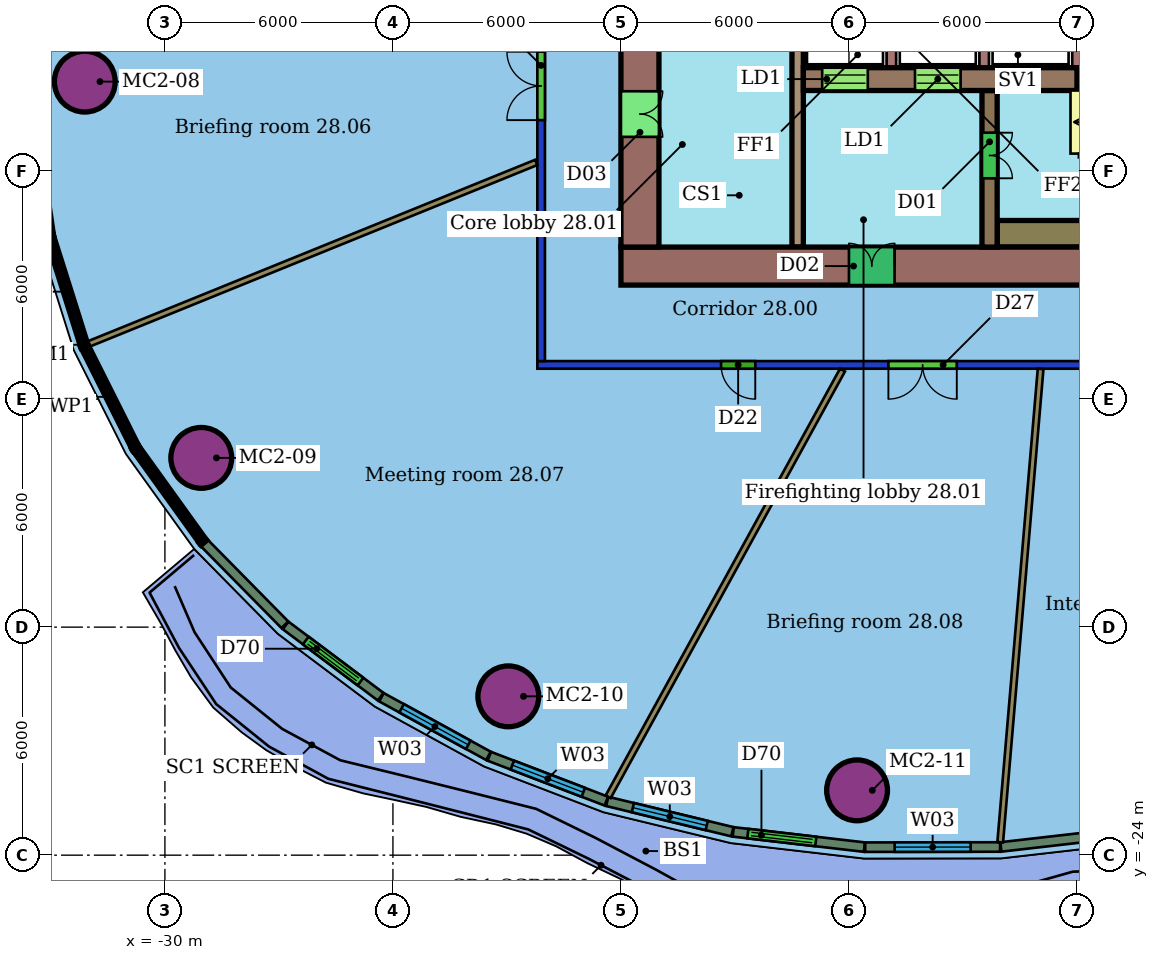
"""IFC4 building model, lengths in metres.
Left out: names, types, materials, properties, quantities, classifications, styles, units other than length and angle.
Written with IfcOpenShell. Run it as: python <this file> out.ifc"""

import sys

from ifc_helpers import new_model, si_unit, direction, frame, frame_2d, origin, origin_2d, place, context, subcontext, project, spatial, rectangle, hollow_circle, extrude, element, fill, save


model = new_model("IFC4")
c1 = context("Model", 3, precision=1e-05, world=origin(), true_north=direction((0.0, 1.0)))
c2 = subcontext(c1, "Body", "Model", "MODEL_VIEW")
j1 = project(units=[si_unit("LENGTHUNIT", "METRE"), si_unit("PLANEANGLEUNIT", "RADIAN")], contexts=[c1])
p1 = place(None, origin())
s1 = spatial("IfcSite", under=j1, at=p1, CompositionType="ELEMENT")
p2 = place(p1, origin())
s2 = spatial("IfcBuilding", under=s1, at=p2, CompositionType="ELEMENT")
p3 = place(p2, frame((0.0, 0.0, 121.0)))
s3 = spatial("IfcBuildingStorey", under=s2, at=p3, CompositionType="ELEMENT", Elevation=121.0)
for number, where, z_axis, x_axis in (
    (1, (-32.109, -3.646, 0.0), (0.0, 0.0, 1.0), (1.0, 0.0, 0.0)),
    (2, (-29.043, -13.547, 0.0), (0.0, 0.0, 1.0), (1.0, 0.0, 0.0)),
    (3, (-20.963, -19.821, 0.0), (0.0, 0.0, 1.0), (1.0, 0.0, 0.0)),
    (4, (-11.787, -22.294, 0.0), (0.0, 0.0, 1.0), (1.0, 0.0, 0.0)),
):
    element("IfcColumn", number, at=place(p3, frame(where, z_axis=z_axis, x_axis=x_axis)), inside=s3, PredefinedType="COLUMN", context=c2, shape_type="SweptSolid", body=[
        extrude(hollow_circle(Radius=0.8, WallThickness=0.055, at=origin_2d()), origin(), (0.0, 0.0, 1.0), 3.45),
    ])
p4 = place(p3, frame((8.2, -11.1, 0.0), z_axis=(0.0, 0.0, 1.0), x_axis=(-1.0, 0.0, 0.0)))
e5 = element("IfcWall", 5, at=p4, inside=s3, PredefinedType="PARTITIONING", context=c2, shape_type="SweptSolid", body=[
    extrude(rectangle(XDim=28.4, YDim=0.2, at=frame_2d((14.2, 0.0))), origin(), (0.0, 0.0, 1.0), 3.0),
])
p5 = place(p4, frame((22.666, 0.0, 0.0)))
e6 = element("IfcOpeningElement", 6, at=p5, cuts=e5, PredefinedType="OPENING", context=c2, shape_type="SweptSolid", body=[
    extrude(rectangle(XDim=0.9, YDim=2.1, at=frame_2d((0.45, 1.05))), frame((0.0, 0.11, 0.0), z_axis=(0.0, -1.0, 0.0), x_axis=(1.0, 0.0, 0.0)), (0.0, 0.0, 1.0), 0.22),
])
p6 = place(p4, frame((17.362, 0.0, 0.0)))
e7 = element("IfcOpeningElement", 7, at=p6, cuts=e5, PredefinedType="OPENING", context=c2, shape_type="SweptSolid", body=[
    extrude(rectangle(XDim=1.8, YDim=2.4, at=frame_2d((0.9, 1.2))), frame((0.0, 0.11, 0.0), z_axis=(0.0, -1.0, 0.0), x_axis=(1.0, 0.0, 0.0)), (0.0, 0.0, 1.0), 0.22),
])
p7 = place(p4, frame((12.592, 0.0, 0.0)))
e8 = element("IfcOpeningElement", 8, at=p7, cuts=e5, PredefinedType="OPENING", context=c2, shape_type="SweptSolid", body=[
    extrude(rectangle(XDim=0.9, YDim=2.1, at=frame_2d((0.45, 1.05))), frame((0.0, 0.11, 0.0), z_axis=(0.0, -1.0, 0.0), x_axis=(1.0, 0.0, 0.0)), (0.0, 0.0, 1.0), 0.22),
])
p8 = place(p4, frame((6.504, 0.0, 0.0)))
e9 = element("IfcOpeningElement", 9, at=p8, cuts=e5, PredefinedType="OPENING", context=c2, shape_type="SweptSolid", body=[
    extrude(rectangle(XDim=1.5, YDim=2.1, at=frame_2d((0.75, 1.05))), frame((0.0, 0.11, 0.0), z_axis=(0.0, -1.0, 0.0), x_axis=(1.0, 0.0, 0.0)), (0.0, 0.0, 1.0), 0.22),
])
p9 = place(p4, frame((2.423, 0.0, 0.0)))
e10 = element("IfcOpeningElement", 10, at=p9, cuts=e5, PredefinedType="OPENING", context=c2, shape_type="SweptSolid", body=[
    extrude(rectangle(XDim=1.0, YDim=2.1, at=frame_2d((0.5, 1.05))), frame((0.0, 0.11, 0.0), z_axis=(0.0, -1.0, 0.0), x_axis=(1.0, 0.0, 0.0)), (0.0, 0.0, 1.0), 0.22),
])
p10 = place(p3, frame((-20.1, -11.0, 0.0), z_axis=(0.0, 0.0, 1.0), x_axis=(0.0, 1.0, 0.0)))
e11 = element("IfcWall", 11, at=p10, inside=s3, PredefinedType="PARTITIONING", context=c2, shape_type="SweptSolid", body=[
    extrude(rectangle(XDim=22.0, YDim=0.2, at=frame_2d((11.0, 0.0))), origin(), (0.0, 0.0, 1.0), 3.0),
])
p11 = place(p10, frame((15.966, 0.0, 0.0)))
e12 = element("IfcOpeningElement", 12, at=p11, cuts=e11, PredefinedType="OPENING", context=c2, shape_type="SweptSolid", body=[
    extrude(rectangle(XDim=1.0, YDim=2.1, at=frame_2d((0.5, 1.05))), frame((0.0, 0.11, 0.0), z_axis=(0.0, -1.0, 0.0), x_axis=(1.0, 0.0, 0.0)), (0.0, 0.0, 1.0), 0.22),
])
p12 = place(p10, frame((11.613, 0.0, 0.0)))
e13 = element("IfcOpeningElement", 13, at=p12, cuts=e11, PredefinedType="OPENING", context=c2, shape_type="SweptSolid", body=[
    extrude(rectangle(XDim=1.0, YDim=2.4, at=frame_2d((0.5, 1.2))), frame((0.0, 0.11, 0.0), z_axis=(0.0, -1.0, 0.0), x_axis=(1.0, 0.0, 0.0)), (0.0, 0.0, 1.0), 0.22),
])
p13 = place(p10, frame((6.341, 0.0, 0.0)))
e14 = element("IfcOpeningElement", 14, at=p13, cuts=e11, PredefinedType="OPENING", context=c2, shape_type="SweptSolid", body=[
    extrude(rectangle(XDim=1.8, YDim=2.4, at=frame_2d((0.9, 1.2))), frame((0.0, 0.11, 0.0), z_axis=(0.0, -1.0, 0.0), x_axis=(1.0, 0.0, 0.0)), (0.0, 0.0, 1.0), 0.22),
])
p14 = place(p3, frame((-32.006, -10.549, 0.0), z_axis=(0.0, 0.0, 1.0), x_axis=(0.926664050795, 0.375890591749, 0.0)))
e15 = element("IfcWall", 15, at=p14, inside=s3, PredefinedType="PARTITIONING", context=c2, shape_type="SweptSolid", body=[
    extrude(rectangle(XDim=12.709, YDim=0.15, at=frame_2d((6.355, 0.0))), origin(), (0.0, 0.0, 1.0), 3.45),
])
p15 = place(p3, frame((-18.336, -22.463, 0.0), z_axis=(0.0, 0.0, 1.0), x_axis=(0.481358172348, 0.876523992777, 0.0)))
e16 = element("IfcWall", 16, at=p15, inside=s3, PredefinedType="PARTITIONING", context=c2, shape_type="SweptSolid", body=[
    extrude(rectangle(XDim=12.809, YDim=0.15, at=frame_2d((6.404, 0.0))), origin(), (0.0, 0.0, 1.0), 3.45),
])
p16 = place(p3, frame((-8.02, -23.66, 0.0), z_axis=(0.0, 0.0, 1.0), x_axis=(0.085065958211, 0.996375322232, 0.0)))
e17 = element("IfcWall", 17, at=p16, inside=s3, PredefinedType="PARTITIONING", context=c2, shape_type="SweptSolid", body=[
    extrude(rectangle(XDim=12.499, YDim=0.15, at=frame_2d((6.25, 0.0))), origin(), (0.0, 0.0, 1.0), 3.45),
])
p17 = place(p3, frame((-28.961, -15.789, 0.0), z_axis=(0.0, 0.0, 1.0), x_axis=(0.701948142778, -0.71222805677, 0.0)))
e18 = element("IfcWall", 18, at=p17, inside=s3, PredefinedType="SOLIDWALL", context=c2, shape_type="SweptSolid", body=[
    extrude(rectangle(XDim=3.016, YDim=0.25, at=frame_2d((1.508, 0.0))), origin(), (0.0, 0.0, 1.0), 3.05),
])
p18 = place(p3, frame((-26.824, -17.954, 0.0), z_axis=(0.0, 0.0, 1.0), x_axis=(0.799896906683, -0.60013743316, 0.0)))
e19 = element("IfcWall", 19, at=p18, inside=s3, PredefinedType="SOLIDWALL", context=c2, shape_type="SweptSolid", body=[
    extrude(rectangle(XDim=3.126, YDim=0.25, at=frame_2d((1.563, 0.0))), origin(), (0.0, 0.0, 1.0), 3.05),
])
p19 = place(p18, frame((0.663, 0.0, 0.0)))
e20 = element("IfcOpeningElement", 20, at=p19, cuts=e19, PredefinedType="OPENING", context=c2, shape_type="SweptSolid", body=[
    extrude(rectangle(XDim=1.8, YDim=2.4, at=frame_2d((0.9, 1.2))), frame((0.0, 0.135, 0.0), z_axis=(0.0, -1.0, 0.0), x_axis=(1.0, 0.0, 0.0)), (0.0, 0.0, 1.0), 0.27),
])
p20 = place(p3, frame((-24.301, -19.844, 0.0), z_axis=(0.0, 0.0, 1.0), x_axis=(0.876916884628, -0.480642047114, 0.0)))
e21 = element("IfcWall", 21, at=p20, inside=s3, PredefinedType="SOLIDWALL", context=c2, shape_type="SweptSolid", body=[
    extrude(rectangle(XDim=3.209, YDim=0.25, at=frame_2d((1.604, 0.0))), origin(), (0.0, 0.0, 1.0), 3.05),
])
p21 = place(p20, frame((0.604, 0.0, 0.9)))
e22 = element("IfcOpeningElement", 22, at=p21, cuts=e21, PredefinedType="OPENING", context=c2, shape_type="SweptSolid", body=[
    extrude(rectangle(XDim=2.0, YDim=2.1, at=frame_2d((1.0, 1.05))), frame((0.0, 0.135, 0.0), z_axis=(0.0, -1.0, 0.0), x_axis=(1.0, 0.0, 0.0)), (0.0, 0.0, 1.0), 0.27),
])
p22 = place(p3, frame((-21.464, -21.397, 0.0), z_axis=(0.0, 0.0, 1.0), x_axis=(0.933724677667, -0.357991936103, 0.0)))
e23 = element("IfcWall", 23, at=p22, inside=s3, PredefinedType="SOLIDWALL", context=c2, shape_type="SweptSolid", body=[
    extrude(rectangle(XDim=3.299, YDim=0.25, at=frame_2d((1.649, 0.0))), origin(), (0.0, 0.0, 1.0), 3.05),
])
p23 = place(p22, frame((0.649, 0.0, 0.9)))
e24 = element("IfcOpeningElement", 24, at=p23, cuts=e23, PredefinedType="OPENING", context=c2, shape_type="SweptSolid", body=[
    extrude(rectangle(XDim=2.0, YDim=2.1, at=frame_2d((1.0, 1.05))), frame((0.0, 0.135, 0.0), z_axis=(0.0, -1.0, 0.0), x_axis=(1.0, 0.0, 0.0)), (0.0, 0.0, 1.0), 0.27),
])
p24 = place(p3, frame((-18.361, -22.585, 0.0), z_axis=(0.0, 0.0, 1.0), x_axis=(0.971871596081, -0.235511360088, 0.0)))
e25 = element("IfcWall", 25, at=p24, inside=s3, PredefinedType="SOLIDWALL", context=c2, shape_type="SweptSolid", body=[
    extrude(rectangle(XDim=3.389, YDim=0.25, at=frame_2d((1.694, 0.0))), origin(), (0.0, 0.0, 1.0), 3.05),
])
p25 = place(p24, frame((0.695, 0.0, 0.9)))
e26 = element("IfcOpeningElement", 26, at=p25, cuts=e25, PredefinedType="OPENING", context=c2, shape_type="SweptSolid", body=[
    extrude(rectangle(XDim=2.0, YDim=2.1, at=frame_2d((1.0, 1.05))), frame((0.0, 0.135, 0.0), z_axis=(0.0, -1.0, 0.0), x_axis=(1.0, 0.0, 0.0)), (0.0, 0.0, 1.0), 0.27),
])
p26 = place(p3, frame((-15.045, -23.388, 0.0), z_axis=(0.0, 0.0, 1.0), x_axis=(0.993327429038, -0.115328308409, 0.0)))
e27 = element("IfcWall", 27, at=p26, inside=s3, PredefinedType="SOLIDWALL", context=c2, shape_type="SweptSolid", body=[
    extrude(rectangle(XDim=3.474, YDim=0.25, at=frame_2d((1.737, 0.0))), origin(), (0.0, 0.0, 1.0), 3.05),
])
p27 = place(p26, frame((0.387, 0.0, 0.0)))
e28 = element("IfcOpeningElement", 28, at=p27, cuts=e27, PredefinedType="OPENING", context=c2, shape_type="SweptSolid", body=[
    extrude(rectangle(XDim=1.8, YDim=2.4, at=frame_2d((0.9, 1.2))), frame((0.0, 0.135, 0.0), z_axis=(0.0, -1.0, 0.0), x_axis=(1.0, 0.0, 0.0)), (0.0, 0.0, 1.0), 0.27),
])
p28 = place(p3, frame((-11.572, -23.79, 0.0), z_axis=(0.0, 0.0, 1.0), x_axis=(0.999999145394, 0.001307368318, 0.0)))
e29 = element("IfcWall", 29, at=p28, inside=s3, PredefinedType="SOLIDWALL", context=c2, shape_type="SweptSolid", body=[
    extrude(rectangle(XDim=3.548, YDim=0.25, at=frame_2d((1.774, 0.0))), origin(), (0.0, 0.0, 1.0), 3.05),
])
p29 = place(p28, frame((0.774, 0.0, 0.9)))
e30 = element("IfcOpeningElement", 30, at=p29, cuts=e29, PredefinedType="OPENING", context=c2, shape_type="SweptSolid", body=[
    extrude(rectangle(XDim=2.0, YDim=2.1, at=frame_2d((1.0, 1.05))), frame((0.0, 0.135, 0.0), z_axis=(0.0, -1.0, 0.0), x_axis=(1.0, 0.0, 0.0)), (0.0, 0.0, 1.0), 0.27),
])
p30 = place(p3, frame((-8.002, -23.783, 0.0), z_axis=(0.0, 0.0, 1.0), x_axis=(0.993503711569, 0.113799714842, 0.0)))
e31 = element("IfcWall", 31, at=p30, inside=s3, PredefinedType="SOLIDWALL", context=c2, shape_type="SweptSolid", body=[
    extrude(rectangle(XDim=3.563, YDim=0.25, at=frame_2d((1.782, 0.0))), origin(), (0.0, 0.0, 1.0), 3.05),
])
p31 = place(p3, frame((-18.0, -8.5, 0.0), z_axis=(0.0, 0.0, 1.0), x_axis=(1.0, 0.0, 0.0)))
e32 = element("IfcWall", 32, at=p31, inside=s3, PredefinedType="SHEAR", context=c2, shape_type="SweptSolid", body=[
    extrude(rectangle(XDim=24.0, YDim=1.0, at=frame_2d((12.0, 0.0))), origin(), (0.0, 0.0, 1.0), 3.3),
])
p32 = place(p31, frame((6.0, 0.0, 0.0)))
e33 = element("IfcOpeningElement", 33, at=p32, cuts=e32, PredefinedType="OPENING", context=c2, shape_type="SweptSolid", body=[
    extrude(rectangle(XDim=1.2, YDim=2.1, at=frame_2d((0.6, 1.05))), frame((0.0, 0.51, 0.0), z_axis=(0.0, -1.0, 0.0), x_axis=(1.0, 0.0, 0.0)), (0.0, 0.0, 1.0), 1.02),
])
p33 = place(p3, frame((-17.5, 8.0, 0.0), z_axis=(0.0, 0.0, 1.0), x_axis=(0.0, -1.0, 0.0)))
e34 = element("IfcWall", 34, at=p33, inside=s3, PredefinedType="SHEAR", context=c2, shape_type="SweptSolid", body=[
    extrude(rectangle(XDim=16.0, YDim=1.0, at=frame_2d((8.0, 0.0))), origin(), (0.0, 0.0, 1.0), 3.3),
])
p34 = place(p33, frame((11.9, 0.0, 0.0)))
e35 = element("IfcOpeningElement", 35, at=p34, cuts=e34, PredefinedType="OPENING", context=c2, shape_type="SweptSolid", body=[
    extrude(rectangle(XDim=1.2, YDim=2.1, at=frame_2d((0.6, 1.05))), frame((0.0, 0.51, 0.0), z_axis=(0.0, -1.0, 0.0), x_axis=(1.0, 0.0, 0.0)), (0.0, 0.0, 1.0), 1.02),
])
p35 = place(p33, frame((2.9, 0.0, 0.0)))
e36 = element("IfcOpeningElement", 36, at=p35, cuts=e34, PredefinedType="OPENING", context=c2, shape_type="SweptSolid", body=[
    extrude(rectangle(XDim=1.2, YDim=2.1, at=frame_2d((0.6, 1.05))), frame((0.0, 0.51, 0.0), z_axis=(0.0, -1.0, 0.0), x_axis=(1.0, 0.0, 0.0)), (0.0, 0.0, 1.0), 1.02),
])
p36 = place(p3, frame((-13.2, -3.58, 0.0), z_axis=(0.0, 0.0, 1.0), x_axis=(1.0, 0.0, 0.0)))
e37 = element("IfcWall", 37, at=p36, inside=s3, PredefinedType="SHEAR", context=c2, shape_type="SweptSolid", body=[
    extrude(rectangle(XDim=7.2, YDim=0.6, at=frame_2d((3.6, 0.0))), origin(), (0.0, 0.0, 1.0), 3.3),
])
p37 = place(p36, frame((0.496, 0.0, 0.0)))
e38 = element("IfcOpeningElement", 38, at=p37, cuts=e37, PredefinedType="OPENING", context=c2, shape_type="SweptSolid", body=[
    extrude(rectangle(XDim=1.2, YDim=2.1, at=frame_2d((0.6, 1.05))), frame((0.0, 0.31, 0.0), z_axis=(0.0, -1.0, 0.0), x_axis=(1.0, 0.0, 0.0)), (0.0, 0.0, 1.0), 0.62),
])
p38 = place(p36, frame((2.938, 0.0, 0.0)))
e39 = element("IfcOpeningElement", 39, at=p38, cuts=e37, PredefinedType="OPENING", context=c2, shape_type="SweptSolid", body=[
    extrude(rectangle(XDim=1.2, YDim=2.1, at=frame_2d((0.6, 1.05))), frame((0.0, 0.31, 0.0), z_axis=(0.0, -1.0, 0.0), x_axis=(1.0, 0.0, 0.0)), (0.0, 0.0, 1.0), 0.62),
])
p39 = place(p3, frame((-6.0, -3.58, 0.0), z_axis=(0.0, 0.0, 1.0), x_axis=(1.0, 0.0, 0.0)))
e40 = element("IfcWall", 40, at=p39, inside=s3, PredefinedType="SHEAR", context=c2, shape_type="SweptSolid", body=[
    extrude(rectangle(XDim=7.2, YDim=0.6, at=frame_2d((3.6, 0.0))), origin(), (0.0, 0.0, 1.0), 3.3),
])
p40 = place(p3, frame((-13.35, 8.0, 0.0), z_axis=(0.0, 0.0, 1.0), x_axis=(0.0, -1.0, 0.0)))
e41 = element("IfcWall", 41, at=p40, inside=s3, PredefinedType="SHEAR", context=c2, shape_type="SweptSolid", body=[
    extrude(rectangle(XDim=16.0, YDim=0.3, at=frame_2d((8.0, 0.0))), origin(), (0.0, 0.0, 1.0), 3.3),
])
p41 = place(p40, frame((7.25, 0.0, 0.0)))
e42 = element("IfcOpeningElement", 42, at=p41, cuts=e41, PredefinedType="OPENING", context=c2, shape_type="SweptSolid", body=[
    extrude(rectangle(XDim=1.5, YDim=2.1, at=frame_2d((0.75, 1.05))), frame((0.0, 0.16, 0.0), z_axis=(0.0, -1.0, 0.0), x_axis=(1.0, 0.0, 0.0)), (0.0, 0.0, 1.0), 0.32),
])
p42 = place(p3, frame((-8.3, -3.88, 0.0), z_axis=(0.0, 0.0, 1.0), x_axis=(0.0, -1.0, 0.0)))
e43 = element("IfcWall", 43, at=p42, inside=s3, PredefinedType="SHEAR", context=c2, shape_type="SweptSolid", body=[
    extrude(rectangle(XDim=4.12, YDim=0.4, at=frame_2d((2.06, 0.0))), origin(), (0.0, 0.0, 1.0), 3.3),
])
p43 = place(p42, frame((1.11, 0.0, 0.0)))
e44 = element("IfcOpeningElement", 44, at=p43, cuts=e43, PredefinedType="OPENING", context=c2, shape_type="SweptSolid", body=[
    extrude(rectangle(XDim=1.2, YDim=2.1, at=frame_2d((0.6, 1.05))), frame((0.0, 0.21, 0.0), z_axis=(0.0, -1.0, 0.0), x_axis=(1.0, 0.0, 0.0)), (0.0, 0.0, 1.0), 0.42),
])
p44 = place(p3, frame((-8.1, -7.65, 0.0), z_axis=(0.0, 0.0, 1.0), x_axis=(1.0, 0.0, 0.0)))
e45 = element("IfcWall", 45, at=p44, inside=s3, PredefinedType="SHEAR", context=c2, shape_type="SweptSolid", body=[
    extrude(rectangle(XDim=7.05, YDim=0.7, at=frame_2d((3.525, 0.0))), origin(), (0.0, 0.0, 1.0), 3.3),
])
for number, where, z_axis, x_axis in (
    (46, (-10.883, -1.6, 0.0), (0.0, 0.0, 1.0), (0.0, -1.0, 0.0)),
    (47, (-8.442, -1.6, 0.0), (0.0, 0.0, 1.0), (0.0, -1.0, 0.0)),
    (48, (-6.0, -1.6, 0.0), (0.0, 0.0, 1.0), (0.0, -1.0, 0.0)),
):
    element("IfcWall", number, at=place(p3, frame(where, z_axis=z_axis, x_axis=x_axis)), inside=s3, PredefinedType="SHEAR", context=c2, shape_type="SweptSolid", body=[
        extrude(rectangle(XDim=1.68, YDim=0.25, at=frame_2d((0.84, 0.0))), origin(), (0.0, 0.0, 1.0), 3.3),
    ])
p45 = place(p13, origin())
e49 = element("IfcDoor", 49, at=p45, inside=s3, OperationType="DOUBLE_DOOR_SINGLE_SWING", PredefinedType="DOOR", context=c2, shape_type="SweptSolid", body=[
    extrude(rectangle(XDim=1.8, YDim=2.4, at=frame_2d((0.9, 1.2))), frame((0.0, 0.025, 0.0), z_axis=(0.0, -1.0, 0.0), x_axis=(1.0, 0.0, 0.0)), (0.0, 0.0, 1.0), 0.05),
])
fill(e14, e49)
p46 = place(p5, origin())
e50 = element("IfcDoor", 50, at=p46, inside=s3, OperationType="SINGLE_SWING_LEFT", PredefinedType="DOOR", context=c2, shape_type="SweptSolid", body=[
    extrude(rectangle(XDim=0.9, YDim=2.1, at=frame_2d((0.45, 1.05))), frame((0.0, 0.025, 0.0), z_axis=(0.0, -1.0, 0.0), x_axis=(1.0, 0.0, 0.0)), (0.0, 0.0, 1.0), 0.05),
])
fill(e6, e50)
p47 = place(p6, origin())
e51 = element("IfcDoor", 51, at=p47, inside=s3, OperationType="DOUBLE_DOOR_SINGLE_SWING", PredefinedType="DOOR", context=c2, shape_type="SweptSolid", body=[
    extrude(rectangle(XDim=1.8, YDim=2.4, at=frame_2d((0.9, 1.2))), frame((0.0, 0.025, 0.0), z_axis=(0.0, -1.0, 0.0), x_axis=(1.0, 0.0, 0.0)), (0.0, 0.0, 1.0), 0.05),
])
fill(e7, e51)
p48 = place(p19, origin())
e52 = element("IfcDoor", 52, at=p48, inside=s3, OperationType="DOUBLE_DOOR_SLIDING", PredefinedType="DOOR", context=c2, shape_type="SweptSolid", body=[
    extrude(rectangle(XDim=1.8, YDim=2.4, at=frame_2d((0.9, 1.2))), frame((0.0, 0.025, 0.0), z_axis=(0.0, -1.0, 0.0), x_axis=(1.0, 0.0, 0.0)), (0.0, 0.0, 1.0), 0.05),
])
fill(e20, e52)
p49 = place(p21, origin())
e53 = element("IfcWindow", 53, at=p49, inside=s3, PartitioningType="SINGLE_PANEL", PredefinedType="WINDOW", context=c2, shape_type="SweptSolid", body=[
    extrude(rectangle(XDim=2.0, YDim=2.1, at=frame_2d((1.0, 1.05))), frame((0.0, 0.03, 0.0), z_axis=(0.0, -1.0, 0.0), x_axis=(1.0, 0.0, 0.0)), (0.0, 0.0, 1.0), 0.06),
])
fill(e22, e53)
p50 = place(p23, origin())
e54 = element("IfcWindow", 54, at=p50, inside=s3, PartitioningType="SINGLE_PANEL", PredefinedType="WINDOW", context=c2, shape_type="SweptSolid", body=[
    extrude(rectangle(XDim=2.0, YDim=2.1, at=frame_2d((1.0, 1.05))), frame((0.0, 0.03, 0.0), z_axis=(0.0, -1.0, 0.0), x_axis=(1.0, 0.0, 0.0)), (0.0, 0.0, 1.0), 0.06),
])
fill(e24, e54)
p51 = place(p25, origin())
e55 = element("IfcWindow", 55, at=p51, inside=s3, PartitioningType="SINGLE_PANEL", PredefinedType="WINDOW", context=c2, shape_type="SweptSolid", body=[
    extrude(rectangle(XDim=2.0, YDim=2.1, at=frame_2d((1.0, 1.05))), frame((0.0, 0.03, 0.0), z_axis=(0.0, -1.0, 0.0), x_axis=(1.0, 0.0, 0.0)), (0.0, 0.0, 1.0), 0.06),
])
fill(e26, e55)
p52 = place(p27, origin())
e56 = element("IfcDoor", 56, at=p52, inside=s3, OperationType="DOUBLE_DOOR_SLIDING", PredefinedType="DOOR", context=c2, shape_type="SweptSolid", body=[
    extrude(rectangle(XDim=1.8, YDim=2.4, at=frame_2d((0.9, 1.2))), frame((0.0, 0.025, 0.0), z_axis=(0.0, -1.0, 0.0), x_axis=(1.0, 0.0, 0.0)), (0.0, 0.0, 1.0), 0.05),
])
fill(e28, e56)
p53 = place(p29, origin())
e57 = element("IfcWindow", 57, at=p53, inside=s3, PartitioningType="SINGLE_PANEL", PredefinedType="WINDOW", context=c2, shape_type="SweptSolid", body=[
    extrude(rectangle(XDim=2.0, YDim=2.1, at=frame_2d((1.0, 1.05))), frame((0.0, 0.03, 0.0), z_axis=(0.0, -1.0, 0.0), x_axis=(1.0, 0.0, 0.0)), (0.0, 0.0, 1.0), 0.06),
])
fill(e30, e57)
p54 = place(p32, origin())
e58 = element("IfcDoor", 58, at=p54, inside=s3, OperationType="DOUBLE_DOOR_SINGLE_SWING", PredefinedType="NOTDEFINED", context=c2, shape_type="SweptSolid", body=[
    extrude(rectangle(XDim=1.2, YDim=2.1, at=frame_2d((0.6, 1.05))), frame((0.0, 0.025, 0.0), z_axis=(0.0, -1.0, 0.0), x_axis=(1.0, 0.0, 0.0)), (0.0, 0.0, 1.0), 0.05),
])
fill(e33, e58)
p55 = place(p34, origin())
e59 = element("IfcDoor", 59, at=p55, inside=s3, OperationType="DOUBLE_DOOR_SINGLE_SWING", PredefinedType="NOTDEFINED", context=c2, shape_type="SweptSolid", body=[
    extrude(rectangle(XDim=1.2, YDim=2.1, at=frame_2d((0.6, 1.05))), frame((0.0, 0.025, 0.0), z_axis=(0.0, -1.0, 0.0), x_axis=(1.0, 0.0, 0.0)), (0.0, 0.0, 1.0), 0.05),
])
fill(e35, e59)
p56 = place(p37, origin())
e60 = element("IfcDoor", 60, at=p56, inside=s3, OperationType="DOUBLE_DOOR_SLIDING", PredefinedType="NOTDEFINED", context=c2, shape_type="SweptSolid", body=[
    extrude(rectangle(XDim=1.2, YDim=2.1, at=frame_2d((0.6, 1.05))), frame((0.0, 0.025, 0.0), z_axis=(0.0, -1.0, 0.0), x_axis=(1.0, 0.0, 0.0)), (0.0, 0.0, 1.0), 0.05),
])
fill(e38, e60)
p57 = place(p38, origin())
e61 = element("IfcDoor", 61, at=p57, inside=s3, OperationType="DOUBLE_DOOR_SLIDING", PredefinedType="NOTDEFINED", context=c2, shape_type="SweptSolid", body=[
    extrude(rectangle(XDim=1.2, YDim=2.1, at=frame_2d((0.6, 1.05))), frame((0.0, 0.025, 0.0), z_axis=(0.0, -1.0, 0.0), x_axis=(1.0, 0.0, 0.0)), (0.0, 0.0, 1.0), 0.05),
])
fill(e39, e61)
p58 = place(p43, origin())
e62 = element("IfcDoor", 62, at=p58, inside=s3, OperationType="DOUBLE_DOOR_SINGLE_SWING", PredefinedType="NOTDEFINED", context=c2, shape_type="SweptSolid", body=[
    extrude(rectangle(XDim=1.2, YDim=2.1, at=frame_2d((0.6, 1.05))), frame((0.0, 0.025, 0.0), z_axis=(0.0, -1.0, 0.0), x_axis=(1.0, 0.0, 0.0)), (0.0, 0.0, 1.0), 0.05),
])
fill(e44, e62)
save(model, sys.argv[1])
